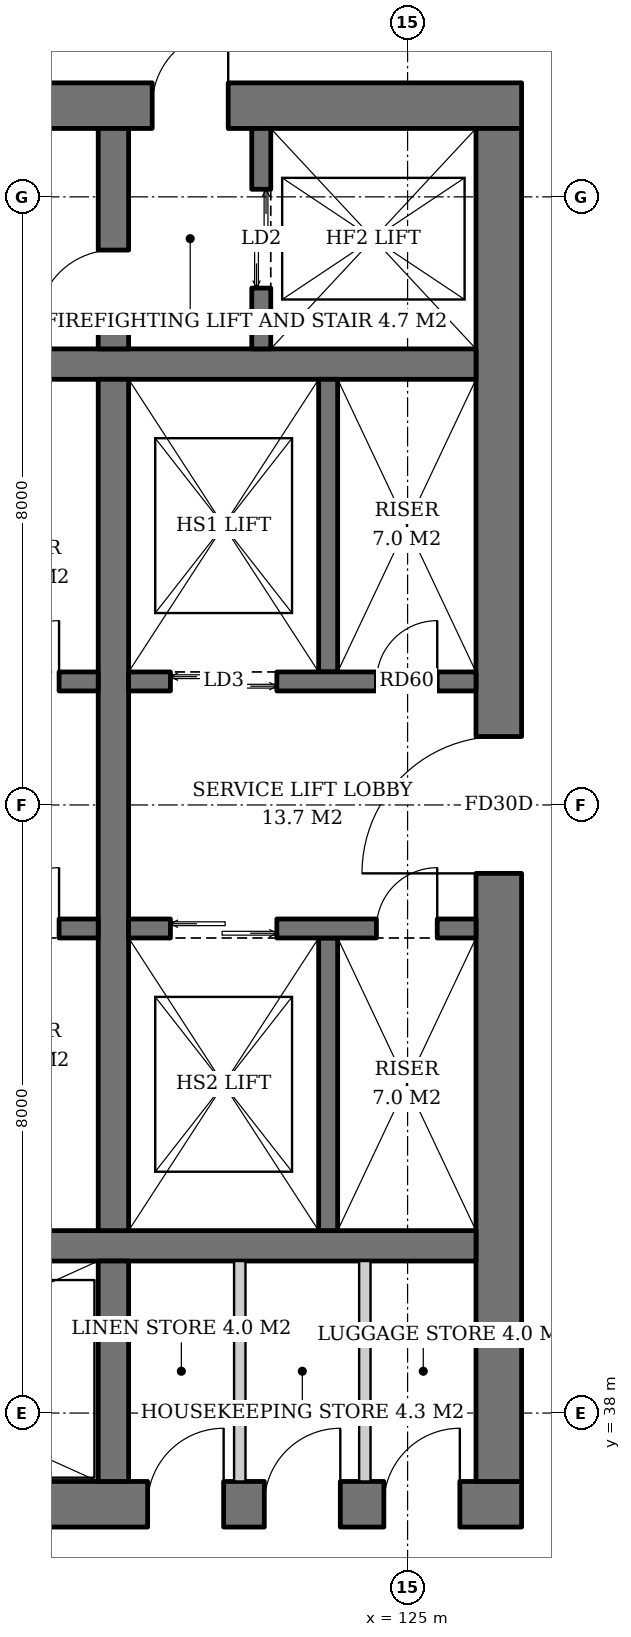
"""IFC4 building model, lengths in metres.
Left out: names, types, materials, properties, quantities, classifications, styles, units other than length and angle.
Written with IfcOpenShell. Run it as: python <this file> out.ifc"""

import sys

from ifc_helpers import new_model, si_unit, direction, frame, frame_2d, origin, place, context, subcontext, project, spatial, rectangle, extrude, element, fill, save


model = new_model("IFC4")
c1 = context("Model", 3, precision=1e-05, world=origin(), true_north=direction((0.0, 1.0)))
c2 = subcontext(c1, "Body", "Model", "MODEL_VIEW")
j1 = project(units=[si_unit("LENGTHUNIT", "METRE"), si_unit("PLANEANGLEUNIT", "RADIAN")], contexts=[c1])
p1 = place(None, origin())
s1 = spatial("IfcSite", under=j1, at=p1, CompositionType="ELEMENT")
p2 = place(p1, origin())
s2 = spatial("IfcBuilding", under=s1, at=p2, CompositionType="ELEMENT")
p3 = place(p2, frame((0.0, 0.0, 100.8)))
s3 = spatial("IfcBuildingStorey", under=s2, at=p3, CompositionType="ELEMENT", Elevation=100.8)
p4 = place(p3, frame((107.5, 36.8, 0.0), z_axis=(0.0, 0.0, 1.0), x_axis=(1.0, 0.0, 0.0)))
e1 = element("IfcWall", 1, at=p4, inside=s3, PredefinedType="SHEAR", context=c2, shape_type="SweptSolid", body=[
    extrude(rectangle(XDim=19.0, YDim=0.6, at=frame_2d((9.5, 0.0))), origin(), (0.0, 0.0, 1.0), 3.8),
])
p5 = place(p4, frame((3.9, 0.0, 0.0)))
e2 = element("IfcOpeningElement", 2, at=p5, cuts=e1, PredefinedType="OPENING", context=c2, shape_type="SweptSolid", body=[
    extrude(rectangle(XDim=1.0, YDim=2.1, at=frame_2d((0.5, 1.05))), frame((0.0, 0.31, 0.0), z_axis=(0.0, -1.0, 0.0), x_axis=(1.0, 0.0, 0.0)), (0.0, 0.0, 1.0), 0.62),
])
p6 = place(p4, frame((14.08, 0.0, 0.0)))
e3 = element("IfcOpeningElement", 3, at=p6, cuts=e1, PredefinedType="OPENING", context=c2, shape_type="SweptSolid", body=[
    extrude(rectangle(XDim=1.0, YDim=2.1, at=frame_2d((0.5, 1.05))), frame((0.0, 0.31, 0.0), z_axis=(0.0, -1.0, 0.0), x_axis=(1.0, 0.0, 0.0)), (0.0, 0.0, 1.0), 0.62),
])
p7 = place(p4, frame((15.615, 0.0, 0.0)))
e4 = element("IfcOpeningElement", 4, at=p7, cuts=e1, PredefinedType="OPENING", context=c2, shape_type="SweptSolid", body=[
    extrude(rectangle(XDim=1.0, YDim=2.1, at=frame_2d((0.5, 1.05))), frame((0.0, 0.31, 0.0), z_axis=(0.0, -1.0, 0.0), x_axis=(1.0, 0.0, 0.0)), (0.0, 0.0, 1.0), 0.62),
])
p8 = place(p4, frame((17.188, 0.0, 0.0)))
e5 = element("IfcOpeningElement", 5, at=p8, cuts=e1, PredefinedType="OPENING", context=c2, shape_type="SweptSolid", body=[
    extrude(rectangle(XDim=1.0, YDim=2.1, at=frame_2d((0.5, 1.05))), frame((0.0, 0.31, 0.0), z_axis=(0.0, -1.0, 0.0), x_axis=(1.0, 0.0, 0.0)), (0.0, 0.0, 1.0), 0.62),
])
p9 = place(p3, frame((107.5, 55.2, 0.0), z_axis=(0.0, 0.0, 1.0), x_axis=(1.0, 0.0, 0.0)))
e6 = element("IfcWall", 6, at=p9, inside=s3, PredefinedType="SHEAR", context=c2, shape_type="SweptSolid", body=[
    extrude(rectangle(XDim=19.0, YDim=0.6, at=frame_2d((9.5, 0.0))), origin(), (0.0, 0.0, 1.0), 3.8),
])
p10 = place(p9, frame((14.14, 0.0, 0.0)))
e7 = element("IfcOpeningElement", 7, at=p10, cuts=e6, PredefinedType="OPENING", context=c2, shape_type="SweptSolid", body=[
    extrude(rectangle(XDim=1.0, YDim=2.1, at=frame_2d((0.5, 1.05))), frame((0.0, 0.31, 0.0), z_axis=(0.0, -1.0, 0.0), x_axis=(1.0, 0.0, 0.0)), (0.0, 0.0, 1.0), 0.62),
])
p11 = place(p9, frame((1.675, 0.0, 0.0)))
e8 = element("IfcOpeningElement", 8, at=p11, cuts=e6, PredefinedType="OPENING", context=c2, shape_type="SweptSolid", body=[
    extrude(rectangle(XDim=1.0, YDim=2.1, at=frame_2d((0.5, 1.05))), frame((0.0, 0.31, 0.0), z_axis=(0.0, -1.0, 0.0), x_axis=(1.0, 0.0, 0.0)), (0.0, 0.0, 1.0), 0.62),
])
p12 = place(p9, frame((3.587, 0.0, 0.0)))
e9 = element("IfcOpeningElement", 9, at=p12, cuts=e6, PredefinedType="OPENING", context=c2, shape_type="SweptSolid", body=[
    extrude(rectangle(XDim=1.0, YDim=2.1, at=frame_2d((0.5, 1.05))), frame((0.0, 0.31, 0.0), z_axis=(0.0, -1.0, 0.0), x_axis=(1.0, 0.0, 0.0)), (0.0, 0.0, 1.0), 0.62),
])
p13 = place(p3, frame((126.2, 37.1, 0.0), z_axis=(0.0, 0.0, 1.0), x_axis=(0.0, 1.0, 0.0)))
e10 = element("IfcWall", 10, at=p13, inside=s3, PredefinedType="SHEAR", context=c2, shape_type="SweptSolid", body=[
    extrude(rectangle(XDim=17.8, YDim=0.6, at=frame_2d((8.9, 0.0))), origin(), (0.0, 0.0, 1.0), 3.8),
])
p14 = place(p13, frame((8.0, 0.0, 0.0)))
e11 = element("IfcOpeningElement", 11, at=p14, cuts=e10, PredefinedType="OPENING", context=c2, shape_type="SweptSolid", body=[
    extrude(rectangle(XDim=1.8, YDim=2.4, at=frame_2d((0.9, 1.2))), frame((0.0, 0.31, 0.0), z_axis=(0.0, -1.0, 0.0), x_axis=(1.0, 0.0, 0.0)), (0.0, 0.0, 1.0), 0.62),
])
for number, where, z_axis, x_axis in (
    (12, (108.1, 40.2, 0.0), (0.0, 0.0, 1.0), (1.0, 0.0, 0.0)),
    (13, (108.1, 51.8, 0.0), (0.0, 0.0, 1.0), (1.0, 0.0, 0.0)),
):
    element("IfcWall", number, at=place(p3, frame(where, z_axis=z_axis, x_axis=x_axis)), inside=s3, PredefinedType="SHEAR", context=c2, shape_type="SweptSolid", body=[
        extrude(rectangle(XDim=17.8, YDim=0.4, at=frame_2d((8.9, 0.0))), origin(), (0.0, 0.0, 1.0), 3.8),
    ])
p15 = place(p3, frame((121.13, 37.1, 0.0), z_axis=(0.0, 0.0, 1.0), x_axis=(0.0, 1.0, 0.0)))
e14 = element("IfcWall", 14, at=p15, inside=s3, PredefinedType="SHEAR", context=c2, shape_type="SweptSolid", body=[
    extrude(rectangle(XDim=2.9, YDim=0.4, at=frame_2d((1.45, 0.0))), origin(), (0.0, 0.0, 1.0), 3.8),
])
p16 = place(p3, frame((121.13, 40.4, 0.0), z_axis=(0.0, 0.0, 1.0), x_axis=(0.0, 1.0, 0.0)))
e15 = element("IfcWall", 15, at=p16, inside=s3, PredefinedType="SHEAR", context=c2, shape_type="SweptSolid", body=[
    extrude(rectangle(XDim=11.2, YDim=0.4, at=frame_2d((5.6, 0.0))), origin(), (0.0, 0.0, 1.0), 3.8),
])
p17 = place(p3, frame((121.13, 52.0, 0.0), z_axis=(0.0, 0.0, 1.0), x_axis=(0.0, 1.0, 0.0)))
e16 = element("IfcWall", 16, at=p17, inside=s3, PredefinedType="SHEAR", context=c2, shape_type="SweptSolid", body=[
    extrude(rectangle(XDim=2.9, YDim=0.4, at=frame_2d((1.45, 0.0))), origin(), (0.0, 0.0, 1.0), 3.8),
])
p18 = place(p17, frame((0.3, 0.0, 0.0)))
e17 = element("IfcOpeningElement", 17, at=p18, cuts=e16, PredefinedType="OPENING", context=c2, shape_type="SweptSolid", body=[
    extrude(rectangle(XDim=1.0, YDim=2.1, at=frame_2d((0.5, 1.05))), frame((0.0, 0.21, 0.0), z_axis=(0.0, -1.0, 0.0), x_axis=(1.0, 0.0, 0.0)), (0.0, 0.0, 1.0), 0.42),
])
p19 = place(p3, frame((123.075, 52.0, 0.0), z_axis=(0.0, 0.0, 1.0), x_axis=(0.0, 1.0, 0.0)))
e18 = element("IfcWall", 18, at=p19, inside=s3, PredefinedType="SHEAR", context=c2, shape_type="SweptSolid", body=[
    extrude(rectangle(XDim=2.9, YDim=0.25, at=frame_2d((1.45, 0.0))), origin(), (0.0, 0.0, 1.0), 3.8),
])
p20 = place(p19, frame((0.8, 0.0, 0.0)))
e19 = element("IfcOpeningElement", 19, at=p20, cuts=e18, PredefinedType="OPENING", context=c2, shape_type="SweptSolid", body=[
    extrude(rectangle(XDim=1.3, YDim=2.2, at=frame_2d((0.65, 1.1))), frame((0.0, 0.135, 0.0), z_axis=(0.0, -1.0, 0.0), x_axis=(1.0, 0.0, 0.0)), (0.0, 0.0, 1.0), 0.27),
])
p21 = place(p3, frame((108.1, 47.625, 0.0), z_axis=(0.0, 0.0, 1.0), x_axis=(1.0, 0.0, 0.0)))
e20 = element("IfcWall", 20, at=p21, inside=s3, PredefinedType="SHEAR", context=c2, shape_type="SweptSolid", body=[
    extrude(rectangle(XDim=12.83, YDim=0.25, at=frame_2d((6.415, 0.0))), origin(), (0.0, 0.0, 1.0), 3.8),
])
p22 = place(p21, frame((0.7, 0.0, 0.0)))
e21 = element("IfcOpeningElement", 21, at=p22, cuts=e20, PredefinedType="OPENING", context=c2, shape_type="SweptSolid", body=[
    extrude(rectangle(XDim=1.1, YDim=2.2, at=frame_2d((0.55, 1.1))), frame((0.0, 0.135, 0.0), z_axis=(0.0, -1.0, 0.0), x_axis=(1.0, 0.0, 0.0)), (0.0, 0.0, 1.0), 0.27),
])
p23 = place(p21, frame((3.45, 0.0, 0.0)))
e22 = element("IfcOpeningElement", 22, at=p23, cuts=e20, PredefinedType="OPENING", context=c2, shape_type="SweptSolid", body=[
    extrude(rectangle(XDim=1.1, YDim=2.2, at=frame_2d((0.55, 1.1))), frame((0.0, 0.135, 0.0), z_axis=(0.0, -1.0, 0.0), x_axis=(1.0, 0.0, 0.0)), (0.0, 0.0, 1.0), 0.27),
])
p24 = place(p21, frame((6.2, 0.0, 0.0)))
e23 = element("IfcOpeningElement", 23, at=p24, cuts=e20, PredefinedType="OPENING", context=c2, shape_type="SweptSolid", body=[
    extrude(rectangle(XDim=1.1, YDim=2.2, at=frame_2d((0.55, 1.1))), frame((0.0, 0.135, 0.0), z_axis=(0.0, -1.0, 0.0), x_axis=(1.0, 0.0, 0.0)), (0.0, 0.0, 1.0), 0.27),
])
p25 = place(p21, frame((8.95, 0.0, 0.0)))
e24 = element("IfcOpeningElement", 24, at=p25, cuts=e20, PredefinedType="OPENING", context=c2, shape_type="SweptSolid", body=[
    extrude(rectangle(XDim=1.1, YDim=2.2, at=frame_2d((0.55, 1.1))), frame((0.0, 0.135, 0.0), z_axis=(0.0, -1.0, 0.0), x_axis=(1.0, 0.0, 0.0)), (0.0, 0.0, 1.0), 0.27),
])
p26 = place(p21, frame((11.515, 0.0, 0.0)))
e25 = element("IfcOpeningElement", 25, at=p26, cuts=e20, PredefinedType="OPENING", context=c2, shape_type="SweptSolid", body=[
    extrude(rectangle(XDim=0.8, YDim=2.0, at=frame_2d((0.4, 1.0))), frame((0.0, 0.135, 0.0), z_axis=(0.0, -1.0, 0.0), x_axis=(1.0, 0.0, 0.0)), (0.0, 0.0, 1.0), 0.27),
])
p27 = place(p3, frame((108.1, 44.375, 0.0), z_axis=(0.0, 0.0, 1.0), x_axis=(1.0, 0.0, 0.0)))
e26 = element("IfcWall", 26, at=p27, inside=s3, PredefinedType="SHEAR", context=c2, shape_type="SweptSolid", body=[
    extrude(rectangle(XDim=12.83, YDim=0.25, at=frame_2d((6.415, 0.0))), origin(), (0.0, 0.0, 1.0), 3.8),
])
p28 = place(p27, frame((0.7, 0.0, 0.0)))
e27 = element("IfcOpeningElement", 27, at=p28, cuts=e26, PredefinedType="OPENING", context=c2, shape_type="SweptSolid", body=[
    extrude(rectangle(XDim=1.1, YDim=2.2, at=frame_2d((0.55, 1.1))), frame((0.0, 0.135, 0.0), z_axis=(0.0, -1.0, 0.0), x_axis=(1.0, 0.0, 0.0)), (0.0, 0.0, 1.0), 0.27),
])
p29 = place(p27, frame((3.45, 0.0, 0.0)))
e28 = element("IfcOpeningElement", 28, at=p29, cuts=e26, PredefinedType="OPENING", context=c2, shape_type="SweptSolid", body=[
    extrude(rectangle(XDim=1.1, YDim=2.2, at=frame_2d((0.55, 1.1))), frame((0.0, 0.135, 0.0), z_axis=(0.0, -1.0, 0.0), x_axis=(1.0, 0.0, 0.0)), (0.0, 0.0, 1.0), 0.27),
])
p30 = place(p27, frame((6.2, 0.0, 0.0)))
e29 = element("IfcOpeningElement", 29, at=p30, cuts=e26, PredefinedType="OPENING", context=c2, shape_type="SweptSolid", body=[
    extrude(rectangle(XDim=1.1, YDim=2.2, at=frame_2d((0.55, 1.1))), frame((0.0, 0.135, 0.0), z_axis=(0.0, -1.0, 0.0), x_axis=(1.0, 0.0, 0.0)), (0.0, 0.0, 1.0), 0.27),
])
p31 = place(p27, frame((9.0, 0.0, 0.0)))
e30 = element("IfcOpeningElement", 30, at=p31, cuts=e26, PredefinedType="OPENING", context=c2, shape_type="SweptSolid", body=[
    extrude(rectangle(XDim=1.0, YDim=2.1, at=frame_2d((0.5, 1.05))), frame((0.0, 0.135, 0.0), z_axis=(0.0, -1.0, 0.0), x_axis=(1.0, 0.0, 0.0)), (0.0, 0.0, 1.0), 0.27),
])
p32 = place(p27, frame((11.515, 0.0, 0.0)))
e31 = element("IfcOpeningElement", 31, at=p32, cuts=e26, PredefinedType="OPENING", context=c2, shape_type="SweptSolid", body=[
    extrude(rectangle(XDim=0.8, YDim=2.0, at=frame_2d((0.4, 1.0))), frame((0.0, 0.135, 0.0), z_axis=(0.0, -1.0, 0.0), x_axis=(1.0, 0.0, 0.0)), (0.0, 0.0, 1.0), 0.27),
])
p33 = place(p3, frame((123.955, 47.75, 0.0), z_axis=(0.0, 0.0, 1.0), x_axis=(0.0, 1.0, 0.0)))
e32 = element("IfcWall", 32, at=p33, inside=s3, PredefinedType="SHEAR", context=c2, shape_type="SweptSolid", body=[
    extrude(rectangle(XDim=3.85, YDim=0.25, at=frame_2d((1.925, 0.0))), origin(), (0.0, 0.0, 1.0), 3.8),
])
p34 = place(p3, frame((121.33, 47.625, 0.0), z_axis=(0.0, 0.0, 1.0), x_axis=(1.0, 0.0, 0.0)))
e33 = element("IfcWall", 33, at=p34, inside=s3, PredefinedType="SHEAR", context=c2, shape_type="SweptSolid", body=[
    extrude(rectangle(XDim=4.57, YDim=0.25, at=frame_2d((2.285, 0.0))), origin(), (0.0, 0.0, 1.0), 3.8),
])
p35 = place(p34, frame((0.55, 0.0, 0.0)))
e34 = element("IfcOpeningElement", 34, at=p35, cuts=e33, PredefinedType="OPENING", context=c2, shape_type="SweptSolid", body=[
    extrude(rectangle(XDim=1.4, YDim=2.4, at=frame_2d((0.7, 1.2))), frame((0.0, 0.135, 0.0), z_axis=(0.0, -1.0, 0.0), x_axis=(1.0, 0.0, 0.0)), (0.0, 0.0, 1.0), 0.27),
])
p36 = place(p34, frame((3.26, 0.0, 0.0)))
e35 = element("IfcOpeningElement", 35, at=p36, cuts=e33, PredefinedType="OPENING", context=c2, shape_type="SweptSolid", body=[
    extrude(rectangle(XDim=0.8, YDim=2.0, at=frame_2d((0.4, 1.0))), frame((0.0, 0.135, 0.0), z_axis=(0.0, -1.0, 0.0), x_axis=(1.0, 0.0, 0.0)), (0.0, 0.0, 1.0), 0.27),
])
p37 = place(p3, frame((123.955, 44.25, 0.0), z_axis=(0.0, 0.0, 1.0), x_axis=(0.0, -1.0, 0.0)))
e36 = element("IfcWall", 36, at=p37, inside=s3, PredefinedType="SHEAR", context=c2, shape_type="SweptSolid", body=[
    extrude(rectangle(XDim=3.85, YDim=0.25, at=frame_2d((1.925, 0.0))), origin(), (0.0, 0.0, 1.0), 3.8),
])
p38 = place(p3, frame((121.33, 44.375, 0.0), z_axis=(0.0, 0.0, 1.0), x_axis=(1.0, 0.0, 0.0)))
e37 = element("IfcWall", 37, at=p38, inside=s3, PredefinedType="SHEAR", context=c2, shape_type="SweptSolid", body=[
    extrude(rectangle(XDim=4.57, YDim=0.25, at=frame_2d((2.285, 0.0))), origin(), (0.0, 0.0, 1.0), 3.8),
])
p39 = place(p38, frame((0.55, 0.0, 0.0)))
e38 = element("IfcOpeningElement", 38, at=p39, cuts=e37, PredefinedType="OPENING", context=c2, shape_type="SweptSolid", body=[
    extrude(rectangle(XDim=1.4, YDim=2.4, at=frame_2d((0.7, 1.2))), frame((0.0, 0.135, 0.0), z_axis=(0.0, -1.0, 0.0), x_axis=(1.0, 0.0, 0.0)), (0.0, 0.0, 1.0), 0.27),
])
p40 = place(p38, frame((3.26, 0.0, 0.0)))
e39 = element("IfcOpeningElement", 39, at=p40, cuts=e37, PredefinedType="OPENING", context=c2, shape_type="SweptSolid", body=[
    extrude(rectangle(XDim=0.8, YDim=2.0, at=frame_2d((0.4, 1.0))), frame((0.0, 0.135, 0.0), z_axis=(0.0, -1.0, 0.0), x_axis=(1.0, 0.0, 0.0)), (0.0, 0.0, 1.0), 0.27),
])
for number, where, z_axis, x_axis in (
    (40, (122.792, 37.1, 0.0), (0.0, 0.0, 1.0), (0.0, 1.0, 0.0)),
    (41, (124.438, 37.1, 0.0), (0.0, 0.0, 1.0), (0.0, 1.0, 0.0)),
):
    element("IfcWall", number, at=place(p3, frame(where, z_axis=z_axis, x_axis=x_axis)), inside=s3, PredefinedType="SOLIDWALL", context=c2, shape_type="SweptSolid", body=[
        extrude(rectangle(XDim=2.9, YDim=0.15, at=frame_2d((1.45, 0.0))), origin(), (0.0, 0.0, 1.0), 3.6),
    ])
p41 = place(p20, origin())
e42 = element("IfcDoor", 42, at=p41, inside=s3, OperationType="DOUBLE_DOOR_SLIDING", PredefinedType="DOOR", context=c2, shape_type="SweptSolid", body=[
    extrude(rectangle(XDim=1.3, YDim=2.2, at=frame_2d((0.65, 1.1))), frame((0.0, 0.025, 0.0), z_axis=(0.0, -1.0, 0.0), x_axis=(1.0, 0.0, 0.0)), (0.0, 0.0, 1.0), 0.05),
])
fill(e19, e42)
p42 = place(p26, origin())
e43 = element("IfcDoor", 43, at=p42, inside=s3, OperationType="SINGLE_SWING_RIGHT", PredefinedType="DOOR", context=c2, shape_type="SweptSolid", body=[
    extrude(rectangle(XDim=0.8, YDim=2.0, at=frame_2d((0.4, 1.0))), frame((0.0, 0.025, 0.0), z_axis=(0.0, -1.0, 0.0), x_axis=(1.0, 0.0, 0.0)), (0.0, 0.0, 1.0), 0.05),
])
fill(e25, e43)
p43 = place(p32, origin())
e44 = element("IfcDoor", 44, at=p43, inside=s3, OperationType="SINGLE_SWING_RIGHT", PredefinedType="DOOR", context=c2, shape_type="SweptSolid", body=[
    extrude(rectangle(XDim=0.8, YDim=2.0, at=frame_2d((0.4, 1.0))), frame((0.0, 0.025, 0.0), z_axis=(0.0, -1.0, 0.0), x_axis=(1.0, 0.0, 0.0)), (0.0, 0.0, 1.0), 0.05),
])
fill(e31, e44)
p44 = place(p35, origin())
e45 = element("IfcDoor", 45, at=p44, inside=s3, OperationType="DOUBLE_DOOR_SLIDING", PredefinedType="DOOR", context=c2, shape_type="SweptSolid", body=[
    extrude(rectangle(XDim=1.4, YDim=2.4, at=frame_2d((0.7, 1.2))), frame((0.0, 0.025, 0.0), z_axis=(0.0, -1.0, 0.0), x_axis=(1.0, 0.0, 0.0)), (0.0, 0.0, 1.0), 0.05),
])
fill(e34, e45)
p45 = place(p36, origin())
e46 = element("IfcDoor", 46, at=p45, inside=s3, OperationType="SINGLE_SWING_RIGHT", PredefinedType="DOOR", context=c2, shape_type="SweptSolid", body=[
    extrude(rectangle(XDim=0.8, YDim=2.0, at=frame_2d((0.4, 1.0))), frame((0.0, 0.025, 0.0), z_axis=(0.0, -1.0, 0.0), x_axis=(1.0, 0.0, 0.0)), (0.0, 0.0, 1.0), 0.05),
])
fill(e35, e46)
p46 = place(p39, origin())
e47 = element("IfcDoor", 47, at=p46, inside=s3, OperationType="DOUBLE_DOOR_SLIDING", PredefinedType="DOOR", context=c2, shape_type="SweptSolid", body=[
    extrude(rectangle(XDim=1.4, YDim=2.4, at=frame_2d((0.7, 1.2))), frame((0.0, 0.025, 0.0), z_axis=(0.0, -1.0, 0.0), x_axis=(1.0, 0.0, 0.0)), (0.0, 0.0, 1.0), 0.05),
])
fill(e38, e47)
p47 = place(p40, origin())
e48 = element("IfcDoor", 48, at=p47, inside=s3, OperationType="SINGLE_SWING_RIGHT", PredefinedType="DOOR", context=c2, shape_type="SweptSolid", body=[
    extrude(rectangle(XDim=0.8, YDim=2.0, at=frame_2d((0.4, 1.0))), frame((0.0, 0.025, 0.0), z_axis=(0.0, -1.0, 0.0), x_axis=(1.0, 0.0, 0.0)), (0.0, 0.0, 1.0), 0.05),
])
fill(e39, e48)
p48 = place(p18, origin())
e49 = element("IfcDoor", 49, at=p48, inside=s3, OperationType="SINGLE_SWING_LEFT", PredefinedType="DOOR", context=c2, shape_type="SweptSolid", body=[
    extrude(rectangle(XDim=1.0, YDim=2.1, at=frame_2d((0.5, 1.05))), frame((0.0, 0.025, 0.0), z_axis=(0.0, -1.0, 0.0), x_axis=(1.0, 0.0, 0.0)), (0.0, 0.0, 1.0), 0.05),
])
fill(e17, e49)
p49 = place(p10, origin())
e50 = element("IfcDoor", 50, at=p49, inside=s3, OperationType="SINGLE_SWING_RIGHT", PredefinedType="DOOR", context=c2, shape_type="SweptSolid", body=[
    extrude(rectangle(XDim=1.0, YDim=2.1, at=frame_2d((0.5, 1.05))), frame((0.0, 0.025, 0.0), z_axis=(0.0, -1.0, 0.0), x_axis=(1.0, 0.0, 0.0)), (0.0, 0.0, 1.0), 0.05),
])
fill(e7, e50)
p50 = place(p14, origin())
e51 = element("IfcDoor", 51, at=p50, inside=s3, OperationType="DOUBLE_DOOR_SINGLE_SWING", PredefinedType="DOOR", context=c2, shape_type="SweptSolid", body=[
    extrude(rectangle(XDim=1.8, YDim=2.4, at=frame_2d((0.9, 1.2))), frame((0.0, 0.025, 0.0), z_axis=(0.0, -1.0, 0.0), x_axis=(1.0, 0.0, 0.0)), (0.0, 0.0, 1.0), 0.05),
])
fill(e11, e51)
p51 = place(p6, origin())
e52 = element("IfcDoor", 52, at=p51, inside=s3, OperationType="SINGLE_SWING_RIGHT", PredefinedType="DOOR", context=c2, shape_type="SweptSolid", body=[
    extrude(rectangle(XDim=1.0, YDim=2.1, at=frame_2d((0.5, 1.05))), frame((0.0, 0.29, 0.0), z_axis=(0.0, -1.0, 0.0), x_axis=(1.0, 0.0, 0.0)), (0.0, 0.0, 1.0), 0.05),
])
fill(e3, e52)
p52 = place(p7, origin())
e53 = element("IfcDoor", 53, at=p52, inside=s3, OperationType="SINGLE_SWING_RIGHT", PredefinedType="DOOR", context=c2, shape_type="SweptSolid", body=[
    extrude(rectangle(XDim=1.0, YDim=2.1, at=frame_2d((0.5, 1.05))), frame((0.0, 0.29, 0.0), z_axis=(0.0, -1.0, 0.0), x_axis=(1.0, 0.0, 0.0)), (0.0, 0.0, 1.0), 0.05),
])
fill(e4, e53)
p53 = place(p8, origin())
e54 = element("IfcDoor", 54, at=p53, inside=s3, OperationType="SINGLE_SWING_RIGHT", PredefinedType="DOOR", context=c2, shape_type="SweptSolid", body=[
    extrude(rectangle(XDim=1.0, YDim=2.1, at=frame_2d((0.5, 1.05))), frame((0.0, 0.29, 0.0), z_axis=(0.0, -1.0, 0.0), x_axis=(1.0, 0.0, 0.0)), (0.0, 0.0, 1.0), 0.05),
])
fill(e5, e54)
save(model, sys.argv[1])
